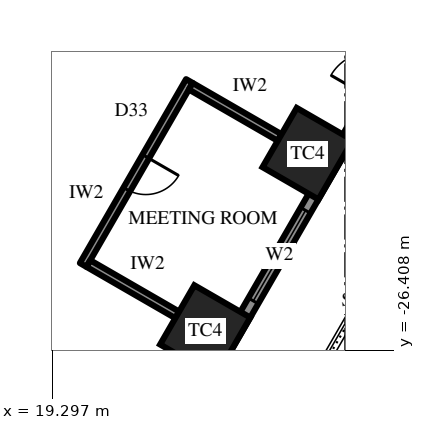
"""IFC4 building model, lengths in metres.
Left out: names, types, materials, properties, quantities, classifications, styles, units other than length and angle.
Written with IfcOpenShell. Run it as: python <this file> out.ifc"""

import sys

from ifc_helpers import new_model, si_unit, direction, frame, frame_2d, origin, origin_2d, place, context, subcontext, project, spatial, rectangle, extrude, element, fill, save


model = new_model("IFC4")
c1 = context("Model", 3, precision=1e-05, world=origin(), true_north=direction((0.0, 1.0)))
c2 = subcontext(c1, "Body", "Model", "MODEL_VIEW")
j1 = project(units=[si_unit("LENGTHUNIT", "METRE"), si_unit("PLANEANGLEUNIT", "RADIAN")], contexts=[c1])
p1 = place(None, origin())
s1 = spatial("IfcSite", under=j1, at=p1, CompositionType="ELEMENT")
p2 = place(p1, origin())
s2 = spatial("IfcBuilding", under=s1, at=p2, CompositionType="ELEMENT")
p3 = place(p2, frame((0.0, 0.0, 90.7)))
s3 = spatial("IfcBuildingStorey", under=s2, at=p3, CompositionType="ELEMENT", Elevation=90.7)
for number, where, z_axis, x_axis in (
    (1, (23.32, -25.908, 0.0), (0.0, 0.0, 1.0), (0.5, 0.866, 0.0)),
    (2, (26.014, -21.242, 0.0), (0.0, 0.0, 1.0), (0.5, 0.866, 0.0)),
):
    element("IfcColumn", number, at=place(p3, frame(where, z_axis=z_axis, x_axis=x_axis)), inside=s3, PredefinedType="COLUMN", context=c2, shape_type="SweptSolid", body=[
        extrude(rectangle(XDim=1.8, YDim=1.7, at=origin_2d()), origin(), (0.0, 0.0, 1.0), 4.2),
    ])
p4 = place(p3, frame((21.232, -30.925, 0.0), z_axis=(0.0, 0.0, 1.0), x_axis=(0.499999163675, 0.866025886636, 0.0)))
e3 = element("IfcWall", 3, at=p4, inside=s3, PredefinedType="SOLIDWALL", context=c2, shape_type="SweptSolid", body=[
    extrude(rectangle(XDim=32.332, YDim=0.3, at=frame_2d((16.166, 0.0))), origin(), (0.0, 0.0, 1.0), 2.7),
])
p5 = place(p4, frame((1.319, 0.0, 0.6)))
e4 = element("IfcOpeningElement", 4, at=p5, cuts=e3, PredefinedType="OPENING", context=c2, shape_type="SweptSolid", body=[
    extrude(rectangle(XDim=2.75, YDim=1.85, at=frame_2d((1.375, 0.925))), frame((0.0, 0.16, 0.0), z_axis=(0.0, -1.0, 0.0), x_axis=(1.0, 0.0, 0.0)), (0.0, 0.0, 1.0), 0.32),
])
p6 = place(p4, frame((6.708, 0.0, 0.6)))
e5 = element("IfcOpeningElement", 5, at=p6, cuts=e3, PredefinedType="OPENING", context=c2, shape_type="SweptSolid", body=[
    extrude(rectangle(XDim=2.75, YDim=1.85, at=frame_2d((1.375, 0.925))), frame((0.0, 0.16, 0.0), z_axis=(0.0, -1.0, 0.0), x_axis=(1.0, 0.0, 0.0)), (0.0, 0.0, 1.0), 0.32),
])
p7 = place(p4, frame((12.872, 0.0, 0.0)))
e6 = element("IfcOpeningElement", 6, at=p7, cuts=e3, PredefinedType="OPENING", context=c2, shape_type="SweptSolid", body=[
    extrude(rectangle(XDim=1.2, YDim=2.4, at=frame_2d((0.6, 1.2))), frame((0.0, 0.16, 0.0), z_axis=(0.0, -1.0, 0.0), x_axis=(1.0, 0.0, 0.0)), (0.0, 0.0, 1.0), 0.32),
])
p8 = place(p4, frame((17.485, 0.0, 0.6)))
e7 = element("IfcOpeningElement", 7, at=p8, cuts=e3, PredefinedType="OPENING", context=c2, shape_type="SweptSolid", body=[
    extrude(rectangle(XDim=2.75, YDim=1.85, at=frame_2d((1.375, 0.925))), frame((0.0, 0.16, 0.0), z_axis=(0.0, -1.0, 0.0), x_axis=(1.0, 0.0, 0.0)), (0.0, 0.0, 1.0), 0.32),
])
p9 = place(p4, frame((22.874, 0.0, 0.6)))
e8 = element("IfcOpeningElement", 8, at=p9, cuts=e3, PredefinedType="OPENING", context=c2, shape_type="SweptSolid", body=[
    extrude(rectangle(XDim=2.75, YDim=1.85, at=frame_2d((1.375, 0.925))), frame((0.0, 0.16, 0.0), z_axis=(0.0, -1.0, 0.0), x_axis=(1.0, 0.0, 0.0)), (0.0, 0.0, 1.0), 0.32),
])
p10 = place(p4, frame((28.262, 0.0, 0.6)))
e9 = element("IfcOpeningElement", 9, at=p10, cuts=e3, PredefinedType="OPENING", context=c2, shape_type="SweptSolid", body=[
    extrude(rectangle(XDim=2.75, YDim=1.85, at=frame_2d((1.375, 0.925))), frame((0.0, 0.16, 0.0), z_axis=(0.0, -1.0, 0.0), x_axis=(1.0, 0.0, 0.0)), (0.0, 0.0, 1.0), 0.32),
])
p11 = place(p3, frame((20.109, -24.17, 0.0), z_axis=(0.0, 0.0, 1.0), x_axis=(0.50001992892, 0.866013897511, 0.0)))
e10 = element("IfcWall", 10, at=p11, inside=s3, PredefinedType="PARTITIONING", context=c2, shape_type="SweptSolid", body=[
    extrude(rectangle(XDim=5.589, YDim=0.2, at=frame_2d((2.794, 0.0))), origin(), (0.0, 0.0, 1.0), 4.0),
])
p12 = place(p11, frame((2.294, 0.0, 0.0)))
e11 = element("IfcOpeningElement", 11, at=p12, cuts=e10, PredefinedType="OPENING", context=c2, shape_type="SweptSolid", body=[
    extrude(rectangle(XDim=1.0, YDim=2.2, at=frame_2d((0.5, 1.1))), frame((0.0, 0.11, 0.0), z_axis=(0.0, -1.0, 0.0), x_axis=(1.0, 0.0, 0.0)), (0.0, 0.0, 1.0), 0.22),
])
p13 = place(p3, frame((20.246, -24.133, 0.0), z_axis=(0.0, 0.0, 1.0), x_axis=(0.86599734893, -0.500048589285, 0.0)))
e12 = element("IfcWall", 12, at=p13, inside=s3, PredefinedType="PARTITIONING", context=c2, shape_type="SweptSolid", body=[
    extrude(rectangle(XDim=2.7, YDim=0.2, at=frame_2d((1.35, 0.0))), origin(), (0.0, 0.0, 1.0), 2.992),
])
p14 = place(p3, frame((22.94, -19.467, 0.0), z_axis=(0.0, 0.0, 1.0), x_axis=(0.866019956843, -0.50000943426, 0.0)))
e13 = element("IfcWall", 13, at=p14, inside=s3, PredefinedType="PARTITIONING", context=c2, shape_type="SweptSolid", body=[
    extrude(rectangle(XDim=2.7, YDim=0.2, at=frame_2d((1.35, 0.0))), origin(), (0.0, 0.0, 1.0), 2.992),
])
p15 = place(p6, origin())
e14 = element("IfcWindow", 14, at=p15, inside=s3, PartitioningType="SINGLE_PANEL", PredefinedType="WINDOW", context=c2, shape_type="SweptSolid", body=[
    extrude(rectangle(XDim=2.75, YDim=1.85, at=frame_2d((1.375, 0.925))), frame((0.0, 0.03, 0.0), z_axis=(0.0, -1.0, 0.0), x_axis=(1.0, 0.0, 0.0)), (0.0, 0.0, 1.0), 0.06),
])
fill(e5, e14)
p16 = place(p12, frame((1.0, 0.0, 0.0), z_axis=(0.0, 0.0, 1.0), x_axis=(-1.0, 0.0, 0.0)))
e15 = element("IfcDoor", 15, at=p16, inside=s3, OperationType="SINGLE_SWING_RIGHT", PredefinedType="DOOR", context=c2, shape_type="SweptSolid", body=[
    extrude(rectangle(XDim=1.0, YDim=2.2, at=frame_2d((0.5, 1.1))), frame((0.0, 0.025, 0.0), z_axis=(0.0, -1.0, 0.0), x_axis=(1.0, 0.0, 0.0)), (0.0, 0.0, 1.0), 0.05),
])
fill(e11, e15)
save(model, sys.argv[1])
